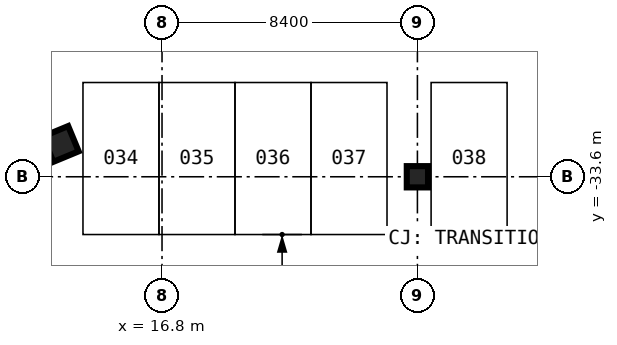
"""IFC4 building model, lengths in metres.
Left out: names, types, materials, properties, quantities, classifications, styles, units other than length and angle.
Written with IfcOpenShell. Run it as: python <this file> out.ifc"""

import sys

from ifc_helpers import new_model, si_unit, direction, frame, origin, origin_2d, place, context, subcontext, project, spatial, rectangle, extrude, element, save


model = new_model("IFC4")
c1 = context("Model", 3, precision=1e-05, world=origin(), true_north=direction((0.0, 1.0)))
c2 = subcontext(c1, "Body", "Model", "MODEL_VIEW")
j1 = project(units=[si_unit("LENGTHUNIT", "METRE"), si_unit("PLANEANGLEUNIT", "RADIAN")], contexts=[c1])
p1 = place(None, origin())
s1 = spatial("IfcSite", under=j1, at=p1, CompositionType="ELEMENT")
p2 = place(p1, origin())
s2 = spatial("IfcBuilding", under=s1, at=p2, CompositionType="ELEMENT")
p3 = place(p2, frame((0.0, 0.0, -13.5)))
s3 = spatial("IfcBuildingStorey", under=s2, at=p3, CompositionType="ELEMENT", Elevation=-13.5)
p4 = place(p3, frame((25.2, -33.6, 0.0), z_axis=(0.0, 0.0, 1.0), x_axis=(1.0, 0.0, 0.0)))
e1 = element("IfcColumn", 1, at=p4, inside=s3, PredefinedType="COLUMN", context=c2, shape_type="SweptSolid", body=[
    extrude(rectangle(XDim=0.7, YDim=0.7, at=origin_2d()), origin(), (0.0, 0.0, 1.0), 4.5),
])
p5 = place(p3, frame((13.47, -32.521, 0.0), z_axis=(0.0, 0.0, 1.0), x_axis=(0.382683432365, -0.923879532511, 0.0)))
e2 = element("IfcColumn", 2, at=p5, inside=s3, PredefinedType="COLUMN", context=c2, shape_type="SweptSolid", body=[
    extrude(rectangle(XDim=0.9, YDim=0.9, at=origin_2d()), origin(), (0.0, 0.0, 1.0), 4.5),
])
save(model, sys.argv[1])
